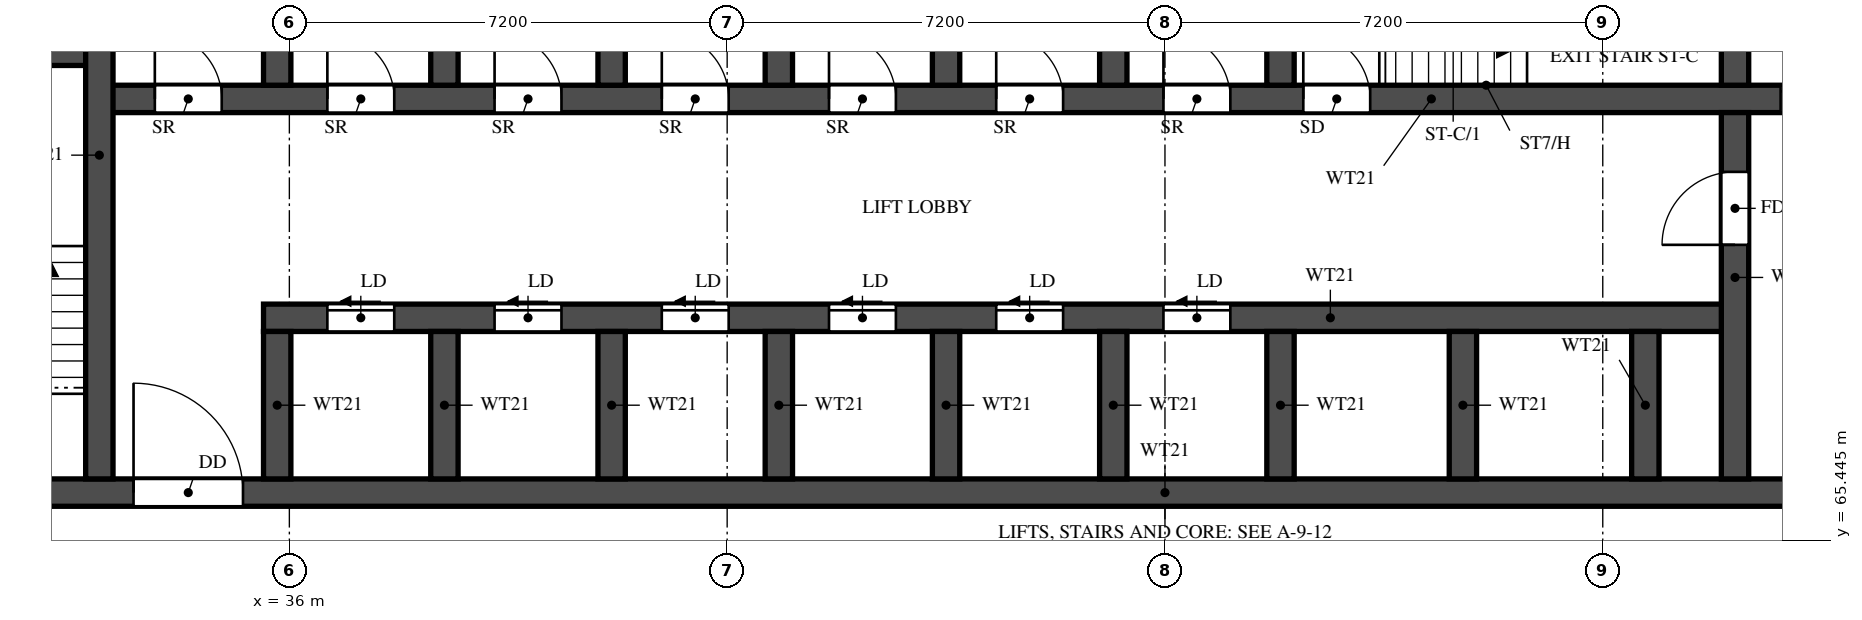
"""IFC4 building model, lengths in metres.
Left out: names, types, materials, properties, quantities, classifications, styles, units other than length and angle.
Written with IfcOpenShell. Run it as: python <this file> out.ifc"""

import sys

from ifc_helpers import new_model, si_unit, direction, frame, frame_2d, origin, place, context, subcontext, project, spatial, rectangle, extrude, element, fill, save


model = new_model("IFC4")
c1 = context("Model", 3, precision=1e-05, world=origin(), true_north=direction((0.0, 1.0)))
c2 = subcontext(c1, "Body", "Model", "MODEL_VIEW")
j1 = project(units=[si_unit("LENGTHUNIT", "METRE"), si_unit("PLANEANGLEUNIT", "RADIAN")], contexts=[c1])
p1 = place(None, origin())
s1 = spatial("IfcSite", under=j1, at=p1, CompositionType="ELEMENT")
p2 = place(p1, origin())
s2 = spatial("IfcBuilding", under=s1, at=p2, CompositionType="ELEMENT")
p3 = place(p2, frame((0.0, 0.0, 76.0)))
s3 = spatial("IfcBuildingStorey", under=s2, at=p3, CompositionType="ELEMENT", Elevation=76.0)
p4 = place(p3, frame((29.7, 66.225, 0.0), z_axis=(0.0, 0.0, 1.0), x_axis=(1.0, 0.0, 0.0)))
e1 = element("IfcWall", 1, at=p4, inside=s3, PredefinedType="SHEAR", context=c2, shape_type="SweptSolid", body=[
    extrude(rectangle(XDim=41.4, YDim=0.45, at=frame_2d((20.7, 0.0))), origin(), (0.0, 0.0, 1.0), 3.18),
])
p5 = place(p4, frame((0.925, 0.0, 0.0)))
e2 = element("IfcOpeningElement", 2, at=p5, cuts=e1, PredefinedType="OPENING", context=c2, shape_type="SweptSolid", body=[
    extrude(rectangle(XDim=1.1, YDim=2.1, at=frame_2d((0.55, 1.05))), frame((0.0, 0.235, 0.0), z_axis=(0.0, -1.0, 0.0), x_axis=(1.0, 0.0, 0.0)), (0.0, 0.0, 1.0), 0.47),
])
p6 = place(p4, frame((3.738, 0.0, 0.0)))
e3 = element("IfcOpeningElement", 3, at=p6, cuts=e1, PredefinedType="OPENING", context=c2, shape_type="SweptSolid", body=[
    extrude(rectangle(XDim=1.8, YDim=2.1, at=frame_2d((0.9, 1.05))), frame((0.0, 0.235, 0.0), z_axis=(0.0, -1.0, 0.0), x_axis=(1.0, 0.0, 0.0)), (0.0, 0.0, 1.0), 0.47),
])
p7 = place(p3, frame((35.575, 69.1, 0.0), z_axis=(0.0, 0.0, 1.0), x_axis=(1.0, 0.0, 0.0)))
e4 = element("IfcWall", 4, at=p7, inside=s3, PredefinedType="SHEAR", context=c2, shape_type="SweptSolid", body=[
    extrude(rectangle(XDim=24.2, YDim=0.45, at=frame_2d((12.1, 0.0))), origin(), (0.0, 0.0, 1.0), 3.18),
])
p8 = place(p7, frame((1.05, 0.0, 0.0)))
e5 = element("IfcOpeningElement", 5, at=p8, cuts=e4, PredefinedType="OPENING", context=c2, shape_type="SweptSolid", body=[
    extrude(rectangle(XDim=1.1, YDim=2.1, at=frame_2d((0.55, 1.05))), frame((0.0, 0.235, 0.0), z_axis=(0.0, -1.0, 0.0), x_axis=(1.0, 0.0, 0.0)), (0.0, 0.0, 1.0), 0.47),
])
p9 = place(p7, frame((3.8, 0.0, 0.0)))
e6 = element("IfcOpeningElement", 6, at=p9, cuts=e4, PredefinedType="OPENING", context=c2, shape_type="SweptSolid", body=[
    extrude(rectangle(XDim=1.1, YDim=2.1, at=frame_2d((0.55, 1.05))), frame((0.0, 0.235, 0.0), z_axis=(0.0, -1.0, 0.0), x_axis=(1.0, 0.0, 0.0)), (0.0, 0.0, 1.0), 0.47),
])
p10 = place(p7, frame((6.55, 0.0, 0.0)))
e7 = element("IfcOpeningElement", 7, at=p10, cuts=e4, PredefinedType="OPENING", context=c2, shape_type="SweptSolid", body=[
    extrude(rectangle(XDim=1.1, YDim=2.1, at=frame_2d((0.55, 1.05))), frame((0.0, 0.235, 0.0), z_axis=(0.0, -1.0, 0.0), x_axis=(1.0, 0.0, 0.0)), (0.0, 0.0, 1.0), 0.47),
])
p11 = place(p7, frame((9.3, 0.0, 0.0)))
e8 = element("IfcOpeningElement", 8, at=p11, cuts=e4, PredefinedType="OPENING", context=c2, shape_type="SweptSolid", body=[
    extrude(rectangle(XDim=1.1, YDim=2.1, at=frame_2d((0.55, 1.05))), frame((0.0, 0.235, 0.0), z_axis=(0.0, -1.0, 0.0), x_axis=(1.0, 0.0, 0.0)), (0.0, 0.0, 1.0), 0.47),
])
p12 = place(p7, frame((12.05, 0.0, 0.0)))
e9 = element("IfcOpeningElement", 9, at=p12, cuts=e4, PredefinedType="OPENING", context=c2, shape_type="SweptSolid", body=[
    extrude(rectangle(XDim=1.1, YDim=2.1, at=frame_2d((0.55, 1.05))), frame((0.0, 0.235, 0.0), z_axis=(0.0, -1.0, 0.0), x_axis=(1.0, 0.0, 0.0)), (0.0, 0.0, 1.0), 0.47),
])
p13 = place(p7, frame((14.8, 0.0, 0.0)))
e10 = element("IfcOpeningElement", 10, at=p13, cuts=e4, PredefinedType="OPENING", context=c2, shape_type="SweptSolid", body=[
    extrude(rectangle(XDim=1.1, YDim=2.1, at=frame_2d((0.55, 1.05))), frame((0.0, 0.235, 0.0), z_axis=(0.0, -1.0, 0.0), x_axis=(1.0, 0.0, 0.0)), (0.0, 0.0, 1.0), 0.47),
])
p14 = place(p3, frame((32.875, 72.7, 0.0), z_axis=(0.0, 0.0, 1.0), x_axis=(1.0, 0.0, 0.0)))
e11 = element("IfcWall", 11, at=p14, inside=s3, PredefinedType="SHEAR", context=c2, shape_type="SweptSolid", body=[
    extrude(rectangle(XDim=35.05, YDim=0.45, at=frame_2d((17.525, 0.0))), origin(), (0.0, 0.0, 1.0), 3.18),
])
p15 = place(p14, frame((19.8, 0.0, 0.0)))
e12 = element("IfcOpeningElement", 12, at=p15, cuts=e11, PredefinedType="OPENING", context=c2, shape_type="SweptSolid", body=[
    extrude(rectangle(XDim=1.1, YDim=2.1, at=frame_2d((0.55, 1.05))), frame((0.0, 0.235, 0.0), z_axis=(0.0, -1.0, 0.0), x_axis=(1.0, 0.0, 0.0)), (0.0, 0.0, 1.0), 0.47),
])
p16 = place(p14, frame((27.65, 0.0, 0.0)))
e13 = element("IfcOpeningElement", 13, at=p16, cuts=e11, PredefinedType="OPENING", context=c2, shape_type="SweptSolid", body=[
    extrude(rectangle(XDim=1.1, YDim=2.1, at=frame_2d((0.55, 1.05))), frame((0.0, 0.235, 0.0), z_axis=(0.0, -1.0, 0.0), x_axis=(1.0, 0.0, 0.0)), (0.0, 0.0, 1.0), 0.47),
])
p17 = place(p14, frame((30.25, 0.0, 0.0)))
e14 = element("IfcOpeningElement", 14, at=p17, cuts=e11, PredefinedType="OPENING", context=c2, shape_type="SweptSolid", body=[
    extrude(rectangle(XDim=1.1, YDim=2.1, at=frame_2d((0.55, 1.05))), frame((0.0, 0.235, 0.0), z_axis=(0.0, -1.0, 0.0), x_axis=(1.0, 0.0, 0.0)), (0.0, 0.0, 1.0), 0.47),
])
p18 = place(p14, frame((3.75, 0.0, 0.0)))
e15 = element("IfcOpeningElement", 15, at=p18, cuts=e11, PredefinedType="OPENING", context=c2, shape_type="SweptSolid", body=[
    extrude(rectangle(XDim=1.1, YDim=2.1, at=frame_2d((0.55, 1.05))), frame((0.0, 0.235, 0.0), z_axis=(0.0, -1.0, 0.0), x_axis=(1.0, 0.0, 0.0)), (0.0, 0.0, 1.0), 0.47),
])
p19 = place(p14, frame((6.5, 0.0, 0.0)))
e16 = element("IfcOpeningElement", 16, at=p19, cuts=e11, PredefinedType="OPENING", context=c2, shape_type="SweptSolid", body=[
    extrude(rectangle(XDim=1.1, YDim=2.1, at=frame_2d((0.55, 1.05))), frame((0.0, 0.235, 0.0), z_axis=(0.0, -1.0, 0.0), x_axis=(1.0, 0.0, 0.0)), (0.0, 0.0, 1.0), 0.47),
])
p20 = place(p14, frame((9.25, 0.0, 0.0)))
e17 = element("IfcOpeningElement", 17, at=p20, cuts=e11, PredefinedType="OPENING", context=c2, shape_type="SweptSolid", body=[
    extrude(rectangle(XDim=1.1, YDim=2.1, at=frame_2d((0.55, 1.05))), frame((0.0, 0.235, 0.0), z_axis=(0.0, -1.0, 0.0), x_axis=(1.0, 0.0, 0.0)), (0.0, 0.0, 1.0), 0.47),
])
p21 = place(p14, frame((12.0, 0.0, 0.0)))
e18 = element("IfcOpeningElement", 18, at=p21, cuts=e11, PredefinedType="OPENING", context=c2, shape_type="SweptSolid", body=[
    extrude(rectangle(XDim=1.1, YDim=2.1, at=frame_2d((0.55, 1.05))), frame((0.0, 0.235, 0.0), z_axis=(0.0, -1.0, 0.0), x_axis=(1.0, 0.0, 0.0)), (0.0, 0.0, 1.0), 0.47),
])
p22 = place(p14, frame((14.75, 0.0, 0.0)))
e19 = element("IfcOpeningElement", 19, at=p22, cuts=e11, PredefinedType="OPENING", context=c2, shape_type="SweptSolid", body=[
    extrude(rectangle(XDim=1.1, YDim=2.1, at=frame_2d((0.55, 1.05))), frame((0.0, 0.235, 0.0), z_axis=(0.0, -1.0, 0.0), x_axis=(1.0, 0.0, 0.0)), (0.0, 0.0, 1.0), 0.47),
])
p23 = place(p14, frame((17.5, 0.0, 0.0)))
e20 = element("IfcOpeningElement", 20, at=p23, cuts=e11, PredefinedType="OPENING", context=c2, shape_type="SweptSolid", body=[
    extrude(rectangle(XDim=1.1, YDim=2.1, at=frame_2d((0.55, 1.05))), frame((0.0, 0.235, 0.0), z_axis=(0.0, -1.0, 0.0), x_axis=(1.0, 0.0, 0.0)), (0.0, 0.0, 1.0), 0.47),
])
p24 = place(p14, frame((0.913, 0.0, 0.0)))
e21 = element("IfcOpeningElement", 21, at=p24, cuts=e11, PredefinedType="OPENING", context=c2, shape_type="SweptSolid", body=[
    extrude(rectangle(XDim=1.1, YDim=2.1, at=frame_2d((0.55, 1.05))), frame((0.0, 0.235, 0.0), z_axis=(0.0, -1.0, 0.0), x_axis=(1.0, 0.0, 0.0)), (0.0, 0.0, 1.0), 0.47),
])
p25 = place(p3, frame((29.7, 73.475, 0.0), z_axis=(0.0, 0.0, 1.0), x_axis=(1.0, 0.0, 0.0)))
e22 = element("IfcWall", 22, at=p25, inside=s3, PredefinedType="SHEAR", context=c2, shape_type="SweptSolid", body=[
    extrude(rectangle(XDim=3.175, YDim=0.45, at=frame_2d((1.587, 0.0))), origin(), (0.0, 0.0, 1.0), 3.18),
])
p26 = place(p3, frame((32.875, 66.45, 0.0), z_axis=(0.0, 0.0, 1.0), x_axis=(0.0, 1.0, 0.0)))
e23 = element("IfcWall", 23, at=p26, inside=s3, PredefinedType="SHEAR", context=c2, shape_type="SweptSolid", body=[
    extrude(rectangle(XDim=10.65, YDim=0.45, at=frame_2d((5.325, 0.0))), origin(), (0.0, 0.0, 1.0), 3.18),
])
p27 = place(p3, frame((59.775, 66.45, 0.0), z_axis=(0.0, 0.0, 1.0), x_axis=(0.0, 1.0, 0.0)))
e24 = element("IfcWall", 24, at=p27, inside=s3, PredefinedType="SHEAR", context=c2, shape_type="SweptSolid", body=[
    extrude(rectangle(XDim=6.025, YDim=0.45, at=frame_2d((3.013, 0.0))), origin(), (0.0, 0.0, 1.0), 3.18),
])
p28 = place(p27, frame((3.85, 0.0, 0.0)))
e25 = element("IfcOpeningElement", 25, at=p28, cuts=e24, PredefinedType="OPENING", context=c2, shape_type="SweptSolid", body=[
    extrude(rectangle(XDim=1.2, YDim=2.1, at=frame_2d((0.6, 1.05))), frame((0.0, 0.235, 0.0), z_axis=(0.0, -1.0, 0.0), x_axis=(1.0, 0.0, 0.0)), (0.0, 0.0, 1.0), 0.47),
])
p29 = place(p3, frame((59.775, 72.925, 0.0), z_axis=(0.0, 0.0, 1.0), x_axis=(0.0, 1.0, 0.0)))
e26 = element("IfcWall", 26, at=p29, inside=s3, PredefinedType="SHEAR", context=c2, shape_type="SweptSolid", body=[
    extrude(rectangle(XDim=2.95, YDim=0.45, at=frame_2d((1.475, 0.0))), origin(), (0.0, 0.0, 1.0), 3.18),
])
for number, where, z_axis, x_axis in (
    (27, (35.8, 66.45, 0.0), (0.0, 0.0, 1.0), (0.0, 1.0, 0.0)),
    (28, (38.55, 66.45, 0.0), (0.0, 0.0, 1.0), (0.0, 1.0, 0.0)),
    (29, (41.3, 66.45, 0.0), (0.0, 0.0, 1.0), (0.0, 1.0, 0.0)),
    (30, (44.05, 66.45, 0.0), (0.0, 0.0, 1.0), (0.0, 1.0, 0.0)),
    (31, (46.8, 66.45, 0.0), (0.0, 0.0, 1.0), (0.0, 1.0, 0.0)),
    (32, (49.55, 66.45, 0.0), (0.0, 0.0, 1.0), (0.0, 1.0, 0.0)),
    (33, (52.3, 66.45, 0.0), (0.0, 0.0, 1.0), (0.0, 1.0, 0.0)),
    (34, (55.3, 66.45, 0.0), (0.0, 0.0, 1.0), (0.0, 1.0, 0.0)),
    (35, (58.3, 66.45, 0.0), (0.0, 0.0, 1.0), (0.0, 1.0, 0.0)),
):
    element("IfcWall", number, at=place(p3, frame(where, z_axis=z_axis, x_axis=x_axis)), inside=s3, PredefinedType="SHEAR", context=c2, shape_type="SweptSolid", body=[
        extrude(rectangle(XDim=2.425, YDim=0.45, at=frame_2d((1.212, 0.0))), origin(), (0.0, 0.0, 1.0), 3.18),
    ])
for number, where, z_axis, x_axis in (
    (36, (35.8, 72.925, 0.0), (0.0, 0.0, 1.0), (0.0, 1.0, 0.0)),
    (37, (38.55, 72.925, 0.0), (0.0, 0.0, 1.0), (0.0, 1.0, 0.0)),
    (38, (41.3, 72.925, 0.0), (0.0, 0.0, 1.0), (0.0, 1.0, 0.0)),
    (39, (44.05, 72.925, 0.0), (0.0, 0.0, 1.0), (0.0, 1.0, 0.0)),
    (40, (46.8, 72.925, 0.0), (0.0, 0.0, 1.0), (0.0, 1.0, 0.0)),
    (41, (49.55, 72.925, 0.0), (0.0, 0.0, 1.0), (0.0, 1.0, 0.0)),
    (42, (52.3, 72.925, 0.0), (0.0, 0.0, 1.0), (0.0, 1.0, 0.0)),
):
    element("IfcWall", number, at=place(p3, frame(where, z_axis=z_axis, x_axis=x_axis)), inside=s3, PredefinedType="SHEAR", context=c2, shape_type="SweptSolid", body=[
        extrude(rectangle(XDim=2.95, YDim=0.45, at=frame_2d((1.475, 0.0))), origin(), (0.0, 0.0, 1.0), 3.18),
    ])
p30 = place(p15, origin())
e43 = element("IfcDoor", 43, at=p30, inside=s3, OperationType="SINGLE_SWING_LEFT", PredefinedType="DOOR", context=c2, shape_type="SweptSolid", body=[
    extrude(rectangle(XDim=1.1, YDim=2.1, at=frame_2d((0.55, 1.05))), frame((0.0, 0.025, 0.0), z_axis=(0.0, -1.0, 0.0), x_axis=(1.0, 0.0, 0.0)), (0.0, 0.0, 1.0), 0.05),
])
fill(e12, e43)
p31 = place(p6, origin())
e44 = element("IfcDoor", 44, at=p31, inside=s3, OperationType="DOUBLE_DOOR_SINGLE_SWING", PredefinedType="DOOR", context=c2, shape_type="SweptSolid", body=[
    extrude(rectangle(XDim=1.8, YDim=2.1, at=frame_2d((0.9, 1.05))), frame((0.0, 0.025, 0.0), z_axis=(0.0, -1.0, 0.0), x_axis=(1.0, 0.0, 0.0)), (0.0, 0.0, 1.0), 0.05),
])
fill(e3, e44)
p32 = place(p28, origin())
e45 = element("IfcDoor", 45, at=p32, inside=s3, OperationType="SINGLE_SWING_RIGHT", PredefinedType="DOOR", context=c2, shape_type="SweptSolid", body=[
    extrude(rectangle(XDim=1.2, YDim=2.1, at=frame_2d((0.6, 1.05))), frame((0.0, 0.025, 0.0), z_axis=(0.0, -1.0, 0.0), x_axis=(1.0, 0.0, 0.0)), (0.0, 0.0, 1.0), 0.05),
])
fill(e25, e45)
p33 = place(p16, origin())
e46 = element("IfcDoor", 46, at=p33, inside=s3, OperationType="SLIDING_TO_LEFT", PredefinedType="DOOR", context=c2, shape_type="SweptSolid", body=[
    extrude(rectangle(XDim=1.1, YDim=2.1, at=frame_2d((0.55, 1.05))), frame((0.0, 0.025, 0.0), z_axis=(0.0, -1.0, 0.0), x_axis=(1.0, 0.0, 0.0)), (0.0, 0.0, 1.0), 0.05),
])
fill(e13, e46)
p34 = place(p8, origin())
e47 = element("IfcDoor", 47, at=p34, inside=s3, OperationType="SLIDING_TO_LEFT", PredefinedType="DOOR", context=c2, shape_type="SweptSolid", body=[
    extrude(rectangle(XDim=1.1, YDim=2.1, at=frame_2d((0.55, 1.05))), frame((0.0, 0.025, 0.0), z_axis=(0.0, -1.0, 0.0), x_axis=(1.0, 0.0, 0.0)), (0.0, 0.0, 1.0), 0.05),
])
fill(e5, e47)
p35 = place(p9, origin())
e48 = element("IfcDoor", 48, at=p35, inside=s3, OperationType="SLIDING_TO_LEFT", PredefinedType="DOOR", context=c2, shape_type="SweptSolid", body=[
    extrude(rectangle(XDim=1.1, YDim=2.1, at=frame_2d((0.55, 1.05))), frame((0.0, 0.025, 0.0), z_axis=(0.0, -1.0, 0.0), x_axis=(1.0, 0.0, 0.0)), (0.0, 0.0, 1.0), 0.05),
])
fill(e6, e48)
p36 = place(p10, origin())
e49 = element("IfcDoor", 49, at=p36, inside=s3, OperationType="SLIDING_TO_LEFT", PredefinedType="DOOR", context=c2, shape_type="SweptSolid", body=[
    extrude(rectangle(XDim=1.1, YDim=2.1, at=frame_2d((0.55, 1.05))), frame((0.0, 0.025, 0.0), z_axis=(0.0, -1.0, 0.0), x_axis=(1.0, 0.0, 0.0)), (0.0, 0.0, 1.0), 0.05),
])
fill(e7, e49)
p37 = place(p11, origin())
e50 = element("IfcDoor", 50, at=p37, inside=s3, OperationType="SLIDING_TO_LEFT", PredefinedType="DOOR", context=c2, shape_type="SweptSolid", body=[
    extrude(rectangle(XDim=1.1, YDim=2.1, at=frame_2d((0.55, 1.05))), frame((0.0, 0.025, 0.0), z_axis=(0.0, -1.0, 0.0), x_axis=(1.0, 0.0, 0.0)), (0.0, 0.0, 1.0), 0.05),
])
fill(e8, e50)
p38 = place(p12, origin())
e51 = element("IfcDoor", 51, at=p38, inside=s3, OperationType="SLIDING_TO_LEFT", PredefinedType="DOOR", context=c2, shape_type="SweptSolid", body=[
    extrude(rectangle(XDim=1.1, YDim=2.1, at=frame_2d((0.55, 1.05))), frame((0.0, 0.025, 0.0), z_axis=(0.0, -1.0, 0.0), x_axis=(1.0, 0.0, 0.0)), (0.0, 0.0, 1.0), 0.05),
])
fill(e9, e51)
p39 = place(p13, origin())
e52 = element("IfcDoor", 52, at=p39, inside=s3, OperationType="SLIDING_TO_LEFT", PredefinedType="DOOR", context=c2, shape_type="SweptSolid", body=[
    extrude(rectangle(XDim=1.1, YDim=2.1, at=frame_2d((0.55, 1.05))), frame((0.0, 0.025, 0.0), z_axis=(0.0, -1.0, 0.0), x_axis=(1.0, 0.0, 0.0)), (0.0, 0.0, 1.0), 0.05),
])
fill(e10, e52)
p40 = place(p18, origin())
e53 = element("IfcDoor", 53, at=p40, inside=s3, OperationType="SINGLE_SWING_LEFT", PredefinedType="DOOR", context=c2, shape_type="SweptSolid", body=[
    extrude(rectangle(XDim=1.1, YDim=2.1, at=frame_2d((0.55, 1.05))), frame((0.0, 0.025, 0.0), z_axis=(0.0, -1.0, 0.0), x_axis=(1.0, 0.0, 0.0)), (0.0, 0.0, 1.0), 0.05),
])
fill(e15, e53)
p41 = place(p19, origin())
e54 = element("IfcDoor", 54, at=p41, inside=s3, OperationType="SINGLE_SWING_LEFT", PredefinedType="DOOR", context=c2, shape_type="SweptSolid", body=[
    extrude(rectangle(XDim=1.1, YDim=2.1, at=frame_2d((0.55, 1.05))), frame((0.0, 0.025, 0.0), z_axis=(0.0, -1.0, 0.0), x_axis=(1.0, 0.0, 0.0)), (0.0, 0.0, 1.0), 0.05),
])
fill(e16, e54)
p42 = place(p20, origin())
e55 = element("IfcDoor", 55, at=p42, inside=s3, OperationType="SINGLE_SWING_LEFT", PredefinedType="DOOR", context=c2, shape_type="SweptSolid", body=[
    extrude(rectangle(XDim=1.1, YDim=2.1, at=frame_2d((0.55, 1.05))), frame((0.0, 0.025, 0.0), z_axis=(0.0, -1.0, 0.0), x_axis=(1.0, 0.0, 0.0)), (0.0, 0.0, 1.0), 0.05),
])
fill(e17, e55)
p43 = place(p21, origin())
e56 = element("IfcDoor", 56, at=p43, inside=s3, OperationType="SINGLE_SWING_LEFT", PredefinedType="DOOR", context=c2, shape_type="SweptSolid", body=[
    extrude(rectangle(XDim=1.1, YDim=2.1, at=frame_2d((0.55, 1.05))), frame((0.0, 0.025, 0.0), z_axis=(0.0, -1.0, 0.0), x_axis=(1.0, 0.0, 0.0)), (0.0, 0.0, 1.0), 0.05),
])
fill(e18, e56)
p44 = place(p22, origin())
e57 = element("IfcDoor", 57, at=p44, inside=s3, OperationType="SINGLE_SWING_LEFT", PredefinedType="DOOR", context=c2, shape_type="SweptSolid", body=[
    extrude(rectangle(XDim=1.1, YDim=2.1, at=frame_2d((0.55, 1.05))), frame((0.0, 0.025, 0.0), z_axis=(0.0, -1.0, 0.0), x_axis=(1.0, 0.0, 0.0)), (0.0, 0.0, 1.0), 0.05),
])
fill(e19, e57)
p45 = place(p23, origin())
e58 = element("IfcDoor", 58, at=p45, inside=s3, OperationType="SINGLE_SWING_LEFT", PredefinedType="DOOR", context=c2, shape_type="SweptSolid", body=[
    extrude(rectangle(XDim=1.1, YDim=2.1, at=frame_2d((0.55, 1.05))), frame((0.0, 0.025, 0.0), z_axis=(0.0, -1.0, 0.0), x_axis=(1.0, 0.0, 0.0)), (0.0, 0.0, 1.0), 0.05),
])
fill(e20, e58)
p46 = place(p24, origin())
e59 = element("IfcDoor", 59, at=p46, inside=s3, OperationType="SINGLE_SWING_LEFT", PredefinedType="DOOR", context=c2, shape_type="SweptSolid", body=[
    extrude(rectangle(XDim=1.1, YDim=2.1, at=frame_2d((0.55, 1.05))), frame((0.0, 0.025, 0.0), z_axis=(0.0, -1.0, 0.0), x_axis=(1.0, 0.0, 0.0)), (0.0, 0.0, 1.0), 0.05),
])
fill(e21, e59)
save(model, sys.argv[1])
